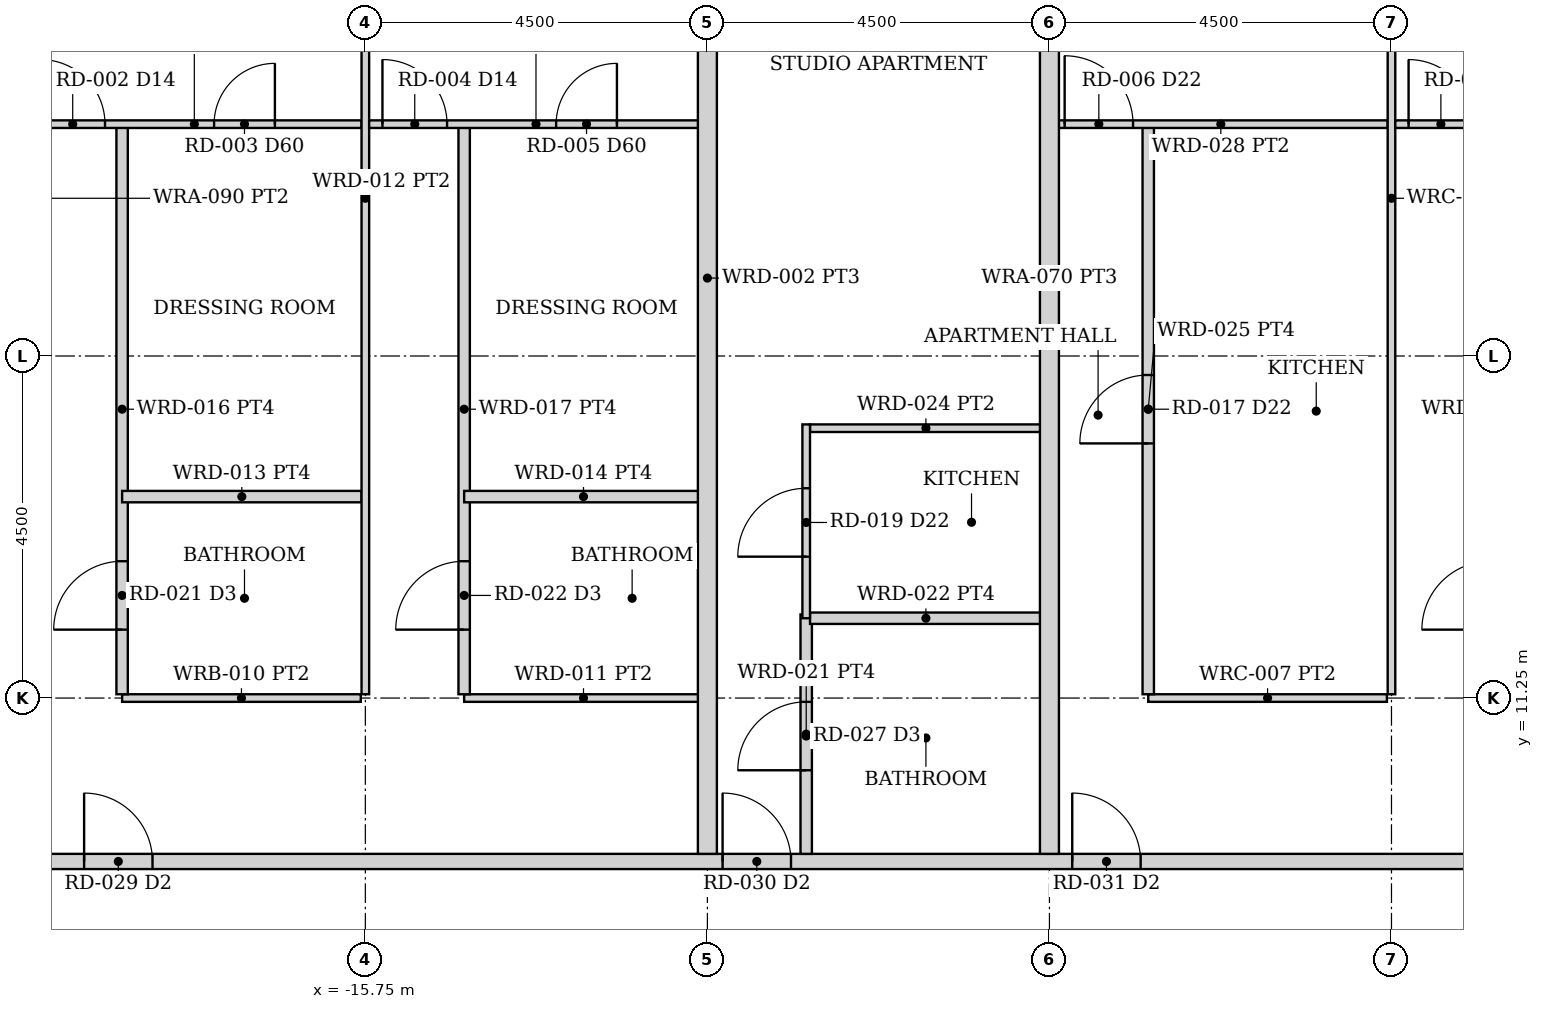
"""IFC4 building model, lengths in metres.
Left out: names, types, materials, properties, quantities, classifications, styles, units other than length and angle.
Written with IfcOpenShell. Run it as: python <this file> out.ifc"""

import sys

from ifc_helpers import new_model, si_unit, direction, frame, frame_2d, origin, place, context, subcontext, project, spatial, rectangle, extrude, element, fill, save


model = new_model("IFC4")
c1 = context("Model", 3, precision=1e-05, world=origin(), true_north=direction((0.0, 1.0)))
c2 = subcontext(c1, "Body", "Model", "MODEL_VIEW")
j1 = project(units=[si_unit("LENGTHUNIT", "METRE"), si_unit("PLANEANGLEUNIT", "RADIAN")], contexts=[c1])
p1 = place(None, origin())
s1 = spatial("IfcSite", under=j1, at=p1, CompositionType="ELEMENT")
p2 = place(p1, origin())
s2 = spatial("IfcBuilding", under=s1, at=p2, CompositionType="ELEMENT")
p3 = place(p2, frame((0.0, 0.0, 58.0)))
s3 = spatial("IfcBuildingStorey", under=s2, at=p3, CompositionType="ELEMENT", Elevation=58.0)
p4 = place(p3, frame((-24.55, 9.1, 0.0), z_axis=(0.0, 0.0, 1.0), x_axis=(1.0, 0.0, 0.0)))
e1 = element("IfcWall", 1, at=p4, inside=s3, PredefinedType="PARTITIONING", context=c2, shape_type="SweptSolid", body=[
    extrude(rectangle(XDim=49.1, YDim=0.2, at=frame_2d((24.55, 0.0))), origin(), (0.0, 0.0, 1.0), 2.373),
])
p5 = place(p4, frame((5.1, 0.0, 0.0)))
e2 = element("IfcOpeningElement", 2, at=p5, cuts=e1, PredefinedType="OPENING", context=c2, shape_type="SweptSolid", body=[
    extrude(rectangle(XDim=0.9, YDim=2.1, at=frame_2d((0.45, 1.05))), frame((0.0, 0.11, 0.0), z_axis=(0.0, -1.0, 0.0), x_axis=(1.0, 0.0, 0.0)), (0.0, 0.0, 1.0), 0.22),
])
p6 = place(p4, frame((13.5, 0.0, 0.0)))
e3 = element("IfcOpeningElement", 3, at=p6, cuts=e1, PredefinedType="OPENING", context=c2, shape_type="SweptSolid", body=[
    extrude(rectangle(XDim=0.9, YDim=2.1, at=frame_2d((0.45, 1.05))), frame((0.0, 0.11, 0.0), z_axis=(0.0, -1.0, 0.0), x_axis=(1.0, 0.0, 0.0)), (0.0, 0.0, 1.0), 0.22),
])
p7 = place(p4, frame((18.1, 0.0, 0.0)))
e4 = element("IfcOpeningElement", 4, at=p7, cuts=e1, PredefinedType="OPENING", context=c2, shape_type="SweptSolid", body=[
    extrude(rectangle(XDim=0.9, YDim=2.1, at=frame_2d((0.45, 1.05))), frame((0.0, 0.11, 0.0), z_axis=(0.0, -1.0, 0.0), x_axis=(1.0, 0.0, 0.0)), (0.0, 0.0, 1.0), 0.22),
])
p8 = place(p4, frame((31.5, 0.0, 0.0)))
e5 = element("IfcOpeningElement", 5, at=p8, cuts=e1, PredefinedType="OPENING", context=c2, shape_type="SweptSolid", body=[
    extrude(rectangle(XDim=0.9, YDim=2.1, at=frame_2d((0.45, 1.05))), frame((0.0, 0.11, 0.0), z_axis=(0.0, -1.0, 0.0), x_axis=(1.0, 0.0, 0.0)), (0.0, 0.0, 1.0), 0.22),
])
p9 = place(p4, frame((43.1, 0.0, 0.0)))
e6 = element("IfcOpeningElement", 6, at=p9, cuts=e1, PredefinedType="OPENING", context=c2, shape_type="SweptSolid", body=[
    extrude(rectangle(XDim=0.9, YDim=2.1, at=frame_2d((0.45, 1.05))), frame((0.0, 0.11, 0.0), z_axis=(0.0, -1.0, 0.0), x_axis=(1.0, 0.0, 0.0)), (0.0, 0.0, 1.0), 0.22),
])
p10 = place(p3, frame((-18.95, 11.25, 0.0), z_axis=(0.0, 0.0, 1.0), x_axis=(1.0, 0.0, 0.0)))
e7 = element("IfcWall", 7, at=p10, inside=s3, PredefinedType="PARTITIONING", context=c2, shape_type="SweptSolid", body=[
    extrude(rectangle(XDim=3.14, YDim=0.1, at=frame_2d((1.57, 0.0))), origin(), (0.0, 0.0, 1.0), 2.373),
])
p11 = place(p3, frame((-18.95, 11.3, 0.0), z_axis=(0.0, 0.0, 1.0), x_axis=(0.0, 1.0, 0.0)))
e8 = element("IfcWall", 8, at=p11, inside=s3, PredefinedType="PARTITIONING", context=c2, shape_type="SweptSolid", body=[
    extrude(rectangle(XDim=7.5, YDim=0.15, at=frame_2d((3.75, 0.0))), origin(), (0.0, 0.0, 1.0), 2.373),
])
p12 = place(p11, frame((0.85, 0.0, 0.0)))
e9 = element("IfcOpeningElement", 9, at=p12, cuts=e8, PredefinedType="OPENING", context=c2, shape_type="SweptSolid", body=[
    extrude(rectangle(XDim=0.9, YDim=2.1, at=frame_2d((0.45, 1.05))), frame((0.0, 0.085, 0.0), z_axis=(0.0, -1.0, 0.0), x_axis=(1.0, 0.0, 0.0)), (0.0, 0.0, 1.0), 0.17),
])
p13 = place(p3, frame((-20.2, 18.8, 0.0), z_axis=(0.0, 0.0, 1.0), x_axis=(1.0, 0.0, 0.0)))
e10 = element("IfcWall", 10, at=p13, inside=s3, PredefinedType="PARTITIONING", context=c2, shape_type="SweptSolid", body=[
    extrude(rectangle(XDim=4.4, YDim=0.1, at=frame_2d((2.2, 0.0))), origin(), (0.0, 0.0, 1.0), 2.373),
])
p14 = place(p13, frame((0.175, 0.0, 0.0)))
e11 = element("IfcOpeningElement", 11, at=p14, cuts=e10, PredefinedType="OPENING", context=c2, shape_type="SweptSolid", body=[
    extrude(rectangle(XDim=0.85, YDim=2.1, at=frame_2d((0.425, 1.05))), frame((0.0, 0.06, 0.0), z_axis=(0.0, -1.0, 0.0), x_axis=(1.0, 0.0, 0.0)), (0.0, 0.0, 1.0), 0.12),
])
p15 = place(p13, frame((2.46, 0.0, 0.0)))
e12 = element("IfcOpeningElement", 12, at=p15, cuts=e10, PredefinedType="OPENING", context=c2, shape_type="SweptSolid", body=[
    extrude(rectangle(XDim=0.8, YDim=2.1, at=frame_2d((0.4, 1.05))), frame((0.0, 0.06, 0.0), z_axis=(0.0, -1.0, 0.0), x_axis=(1.0, 0.0, 0.0)), (0.0, 0.0, 1.0), 0.12),
])
p16 = place(p3, frame((-18.95, 13.9, 0.0), z_axis=(0.0, 0.0, 1.0), x_axis=(1.0, 0.0, 0.0)))
e13 = element("IfcWall", 13, at=p16, inside=s3, PredefinedType="PARTITIONING", context=c2, shape_type="SweptSolid", body=[
    extrude(rectangle(XDim=3.15, YDim=0.15, at=frame_2d((1.575, 0.0))), origin(), (0.0, 0.0, 1.0), 2.373),
])
p17 = place(p3, frame((-15.75, 11.3, 0.0), z_axis=(0.0, 0.0, 1.0), x_axis=(0.0, 1.0, 0.0)))
e14 = element("IfcWall", 14, at=p17, inside=s3, PredefinedType="PARTITIONING", context=c2, shape_type="SweptSolid", body=[
    extrude(rectangle(XDim=13.05, YDim=0.1, at=frame_2d((6.525, 0.0))), origin(), (0.0, 0.0, 1.0), 2.373),
])
p18 = place(p3, frame((-14.45, 11.25, 0.0), z_axis=(0.0, 0.0, 1.0), x_axis=(1.0, 0.0, 0.0)))
e15 = element("IfcWall", 15, at=p18, inside=s3, PredefinedType="PARTITIONING", context=c2, shape_type="SweptSolid", body=[
    extrude(rectangle(XDim=3.14, YDim=0.1, at=frame_2d((1.57, 0.0))), origin(), (0.0, 0.0, 1.0), 2.373),
])
p19 = place(p3, frame((-14.45, 11.3, 0.0), z_axis=(0.0, 0.0, 1.0), x_axis=(0.0, 1.0, 0.0)))
e16 = element("IfcWall", 16, at=p19, inside=s3, PredefinedType="PARTITIONING", context=c2, shape_type="SweptSolid", body=[
    extrude(rectangle(XDim=7.5, YDim=0.15, at=frame_2d((3.75, 0.0))), origin(), (0.0, 0.0, 1.0), 2.373),
])
p20 = place(p19, frame((0.85, 0.0, 0.0)))
e17 = element("IfcOpeningElement", 17, at=p20, cuts=e16, PredefinedType="OPENING", context=c2, shape_type="SweptSolid", body=[
    extrude(rectangle(XDim=0.9, YDim=2.1, at=frame_2d((0.45, 1.05))), frame((0.0, 0.085, 0.0), z_axis=(0.0, -1.0, 0.0), x_axis=(1.0, 0.0, 0.0)), (0.0, 0.0, 1.0), 0.17),
])
p21 = place(p3, frame((-15.7, 18.8, 0.0), z_axis=(0.0, 0.0, 1.0), x_axis=(1.0, 0.0, 0.0)))
e18 = element("IfcWall", 18, at=p21, inside=s3, PredefinedType="PARTITIONING", context=c2, shape_type="SweptSolid", body=[
    extrude(rectangle(XDim=4.39, YDim=0.1, at=frame_2d((2.195, 0.0))), origin(), (0.0, 0.0, 1.0), 2.373),
])
p22 = place(p21, frame((0.175, 0.0, 0.0)))
e19 = element("IfcOpeningElement", 19, at=p22, cuts=e18, PredefinedType="OPENING", context=c2, shape_type="SweptSolid", body=[
    extrude(rectangle(XDim=0.85, YDim=2.1, at=frame_2d((0.425, 1.05))), frame((0.0, 0.06, 0.0), z_axis=(0.0, -1.0, 0.0), x_axis=(1.0, 0.0, 0.0)), (0.0, 0.0, 1.0), 0.12),
])
p23 = place(p21, frame((2.46, 0.0, 0.0)))
e20 = element("IfcOpeningElement", 20, at=p23, cuts=e18, PredefinedType="OPENING", context=c2, shape_type="SweptSolid", body=[
    extrude(rectangle(XDim=0.8, YDim=2.1, at=frame_2d((0.4, 1.05))), frame((0.0, 0.06, 0.0), z_axis=(0.0, -1.0, 0.0), x_axis=(1.0, 0.0, 0.0)), (0.0, 0.0, 1.0), 0.12),
])
p24 = place(p3, frame((-14.45, 13.9, 0.0), z_axis=(0.0, 0.0, 1.0), x_axis=(1.0, 0.0, 0.0)))
e21 = element("IfcWall", 21, at=p24, inside=s3, PredefinedType="PARTITIONING", context=c2, shape_type="SweptSolid", body=[
    extrude(rectangle(XDim=3.14, YDim=0.15, at=frame_2d((1.57, 0.0))), origin(), (0.0, 0.0, 1.0), 2.373),
])
p25 = place(p3, frame((-9.95, 9.2, 0.0), z_axis=(0.0, 0.0, 1.0), x_axis=(0.0, 1.0, 0.0)))
e22 = element("IfcWall", 22, at=p25, inside=s3, PredefinedType="PARTITIONING", context=c2, shape_type="SweptSolid", body=[
    extrude(rectangle(XDim=3.15, YDim=0.15, at=frame_2d((1.575, 0.0))), origin(), (0.0, 0.0, 1.0), 2.373),
])
p26 = place(p25, frame((1.1, 0.0, 0.0)))
e23 = element("IfcOpeningElement", 23, at=p26, cuts=e22, PredefinedType="OPENING", context=c2, shape_type="SweptSolid", body=[
    extrude(rectangle(XDim=0.9, YDim=2.1, at=frame_2d((0.45, 1.05))), frame((0.0, 0.085, 0.0), z_axis=(0.0, -1.0, 0.0), x_axis=(1.0, 0.0, 0.0)), (0.0, 0.0, 1.0), 0.17),
])
p27 = place(p3, frame((-9.9, 12.3, 0.0), z_axis=(0.0, 0.0, 1.0), x_axis=(1.0, 0.0, 0.0)))
e24 = element("IfcWall", 24, at=p27, inside=s3, PredefinedType="PARTITIONING", context=c2, shape_type="SweptSolid", body=[
    extrude(rectangle(XDim=3.05, YDim=0.15, at=frame_2d((1.525, 0.0))), origin(), (0.0, 0.0, 1.0), 2.373),
])
p28 = place(p3, frame((-9.9, 14.8, 0.0), z_axis=(0.0, 0.0, 1.0), x_axis=(1.0, 0.0, 0.0)))
e25 = element("IfcWall", 25, at=p28, inside=s3, PredefinedType="PARTITIONING", context=c2, shape_type="SweptSolid", body=[
    extrude(rectangle(XDim=3.05, YDim=0.1, at=frame_2d((1.525, 0.0))), origin(), (0.0, 0.0, 1.0), 2.373),
])
p29 = place(p3, frame((-9.95, 12.3, 0.0), z_axis=(0.0, 0.0, 1.0), x_axis=(0.0, 1.0, 0.0)))
e26 = element("IfcWall", 26, at=p29, inside=s3, PredefinedType="PARTITIONING", context=c2, shape_type="SweptSolid", body=[
    extrude(rectangle(XDim=2.55, YDim=0.1, at=frame_2d((1.275, 0.0))), origin(), (0.0, 0.0, 1.0), 2.373),
])
p30 = place(p29, frame((0.81, 0.0, 0.0)))
e27 = element("IfcOpeningElement", 27, at=p30, cuts=e26, PredefinedType="OPENING", context=c2, shape_type="SweptSolid", body=[
    extrude(rectangle(XDim=0.9, YDim=2.1, at=frame_2d((0.45, 1.05))), frame((0.0, 0.06, 0.0), z_axis=(0.0, -1.0, 0.0), x_axis=(1.0, 0.0, 0.0)), (0.0, 0.0, 1.0), 0.12),
])
p31 = place(p3, frame((-5.45, 11.25, 0.0), z_axis=(0.0, 0.0, 1.0), x_axis=(1.0, 0.0, 0.0)))
e28 = element("IfcWall", 28, at=p31, inside=s3, PredefinedType="PARTITIONING", context=c2, shape_type="SweptSolid", body=[
    extrude(rectangle(XDim=3.14, YDim=0.1, at=frame_2d((1.57, 0.0))), origin(), (0.0, 0.0, 1.0), 2.373),
])
p32 = place(p3, frame((-5.45, 11.3, 0.0), z_axis=(0.0, 0.0, 1.0), x_axis=(0.0, 1.0, 0.0)))
e29 = element("IfcWall", 29, at=p32, inside=s3, PredefinedType="PARTITIONING", context=c2, shape_type="SweptSolid", body=[
    extrude(rectangle(XDim=7.5, YDim=0.15, at=frame_2d((3.75, 0.0))), origin(), (0.0, 0.0, 1.0), 2.373),
])
p33 = place(p32, frame((3.3, 0.0, 0.0)))
e30 = element("IfcOpeningElement", 30, at=p33, cuts=e29, PredefinedType="OPENING", context=c2, shape_type="SweptSolid", body=[
    extrude(rectangle(XDim=0.9, YDim=2.1, at=frame_2d((0.45, 1.05))), frame((0.0, 0.085, 0.0), z_axis=(0.0, -1.0, 0.0), x_axis=(1.0, 0.0, 0.0)), (0.0, 0.0, 1.0), 0.17),
])
p34 = place(p3, frame((-6.69, 18.8, 0.0), z_axis=(0.0, 0.0, 1.0), x_axis=(1.0, 0.0, 0.0)))
e31 = element("IfcWall", 31, at=p34, inside=s3, PredefinedType="PARTITIONING", context=c2, shape_type="SweptSolid", body=[
    extrude(rectangle(XDim=4.39, YDim=0.1, at=frame_2d((2.195, 0.0))), origin(), (0.0, 0.0, 1.0), 2.373),
])
p35 = place(p34, frame((0.14, 0.0, 0.0)))
e32 = element("IfcOpeningElement", 32, at=p35, cuts=e31, PredefinedType="OPENING", context=c2, shape_type="SweptSolid", body=[
    extrude(rectangle(XDim=0.9, YDim=2.1, at=frame_2d((0.45, 1.05))), frame((0.0, 0.06, 0.0), z_axis=(0.0, -1.0, 0.0), x_axis=(1.0, 0.0, 0.0)), (0.0, 0.0, 1.0), 0.12),
])
p36 = place(p3, frame((-2.25, 11.3, 0.0), z_axis=(0.0, 0.0, 1.0), x_axis=(0.0, 1.0, 0.0)))
e33 = element("IfcWall", 33, at=p36, inside=s3, PredefinedType="PARTITIONING", context=c2, shape_type="SweptSolid", body=[
    extrude(rectangle(XDim=13.05, YDim=0.1, at=frame_2d((6.525, 0.0))), origin(), (0.0, 0.0, 1.0), 2.373),
])
p37 = place(p3, frame((-2.2, 18.8, 0.0), z_axis=(0.0, 0.0, 1.0), x_axis=(1.0, 0.0, 0.0)))
e34 = element("IfcWall", 34, at=p37, inside=s3, PredefinedType="PARTITIONING", context=c2, shape_type="SweptSolid", body=[
    extrude(rectangle(XDim=4.4, YDim=0.1, at=frame_2d((2.2, 0.0))), origin(), (0.0, 0.0, 1.0), 2.373),
])
p38 = place(p37, frame((0.175, 0.0, 0.0)))
e35 = element("IfcOpeningElement", 35, at=p38, cuts=e34, PredefinedType="OPENING", context=c2, shape_type="SweptSolid", body=[
    extrude(rectangle(XDim=0.85, YDim=2.1, at=frame_2d((0.425, 1.05))), frame((0.0, 0.06, 0.0), z_axis=(0.0, -1.0, 0.0), x_axis=(1.0, 0.0, 0.0)), (0.0, 0.0, 1.0), 0.12),
])
p39 = place(p37, frame((2.46, 0.0, 0.0)))
e36 = element("IfcOpeningElement", 36, at=p39, cuts=e34, PredefinedType="OPENING", context=c2, shape_type="SweptSolid", body=[
    extrude(rectangle(XDim=0.8, YDim=2.1, at=frame_2d((0.4, 1.05))), frame((0.0, 0.06, 0.0), z_axis=(0.0, -1.0, 0.0), x_axis=(1.0, 0.0, 0.0)), (0.0, 0.0, 1.0), 0.12),
])
for number, where, z_axis, x_axis in (
    (37, (-11.25, 9.2, 0.0), (0.0, 0.0, 1.0), (0.0, 1.0, 0.0)),
    (38, (-6.75, 9.2, 0.0), (0.0, 0.0, 1.0), (0.0, 1.0, 0.0)),
):
    element("IfcWall", number, at=place(p3, frame(where, z_axis=z_axis, x_axis=x_axis)), inside=s3, PredefinedType="PARTITIONING", context=c2, shape_type="SweptSolid", body=[
        extrude(rectangle(XDim=15.15, YDim=0.25, at=frame_2d((7.575, 0.0))), origin(), (0.0, 0.0, 1.0), 2.373),
    ])
p40 = place(p5, origin())
e39 = element("IfcDoor", 39, at=p40, inside=s3, OperationType="SINGLE_SWING_LEFT", PredefinedType="DOOR", context=c2, shape_type="SweptSolid", body=[
    extrude(rectangle(XDim=0.9, YDim=2.1, at=frame_2d((0.45, 1.05))), frame((0.0, 0.025, 0.0), z_axis=(0.0, -1.0, 0.0), x_axis=(1.0, 0.0, 0.0)), (0.0, 0.0, 1.0), 0.05),
])
fill(e2, e39)
p41 = place(p14, origin())
e40 = element("IfcDoor", 40, at=p41, inside=s3, OperationType="SINGLE_SWING_LEFT", PredefinedType="DOOR", context=c2, shape_type="SweptSolid", body=[
    extrude(rectangle(XDim=0.85, YDim=2.1, at=frame_2d((0.425, 1.05))), frame((0.0, 0.025, 0.0), z_axis=(0.0, -1.0, 0.0), x_axis=(1.0, 0.0, 0.0)), (0.0, 0.0, 1.0), 0.05),
])
fill(e11, e40)
p42 = place(p12, origin())
e41 = element("IfcDoor", 41, at=p42, inside=s3, OperationType="SINGLE_SWING_LEFT", PredefinedType="DOOR", context=c2, shape_type="SweptSolid", body=[
    extrude(rectangle(XDim=0.9, YDim=2.1, at=frame_2d((0.45, 1.05))), frame((0.0, 0.025, 0.0), z_axis=(0.0, -1.0, 0.0), x_axis=(1.0, 0.0, 0.0)), (0.0, 0.0, 1.0), 0.05),
])
fill(e9, e41)
p43 = place(p15, origin())
e42 = element("IfcDoor", 42, at=p43, inside=s3, OperationType="SINGLE_SWING_RIGHT", PredefinedType="DOOR", context=c2, shape_type="SweptSolid", body=[
    extrude(rectangle(XDim=0.8, YDim=2.1, at=frame_2d((0.4, 1.05))), frame((0.0, 0.025, 0.0), z_axis=(0.0, -1.0, 0.0), x_axis=(1.0, 0.0, 0.0)), (0.0, 0.0, 1.0), 0.05),
])
fill(e12, e42)
p44 = place(p22, origin())
e43 = element("IfcDoor", 43, at=p44, inside=s3, OperationType="SINGLE_SWING_LEFT", PredefinedType="DOOR", context=c2, shape_type="SweptSolid", body=[
    extrude(rectangle(XDim=0.85, YDim=2.1, at=frame_2d((0.425, 1.05))), frame((0.0, 0.025, 0.0), z_axis=(0.0, -1.0, 0.0), x_axis=(1.0, 0.0, 0.0)), (0.0, 0.0, 1.0), 0.05),
])
fill(e19, e43)
p45 = place(p20, origin())
e44 = element("IfcDoor", 44, at=p45, inside=s3, OperationType="SINGLE_SWING_LEFT", PredefinedType="DOOR", context=c2, shape_type="SweptSolid", body=[
    extrude(rectangle(XDim=0.9, YDim=2.1, at=frame_2d((0.45, 1.05))), frame((0.0, 0.025, 0.0), z_axis=(0.0, -1.0, 0.0), x_axis=(1.0, 0.0, 0.0)), (0.0, 0.0, 1.0), 0.05),
])
fill(e17, e44)
p46 = place(p23, origin())
e45 = element("IfcDoor", 45, at=p46, inside=s3, OperationType="SINGLE_SWING_RIGHT", PredefinedType="DOOR", context=c2, shape_type="SweptSolid", body=[
    extrude(rectangle(XDim=0.8, YDim=2.1, at=frame_2d((0.4, 1.05))), frame((0.0, 0.025, 0.0), z_axis=(0.0, -1.0, 0.0), x_axis=(1.0, 0.0, 0.0)), (0.0, 0.0, 1.0), 0.05),
])
fill(e20, e45)
p47 = place(p6, origin())
e46 = element("IfcDoor", 46, at=p47, inside=s3, OperationType="SINGLE_SWING_LEFT", PredefinedType="DOOR", context=c2, shape_type="SweptSolid", body=[
    extrude(rectangle(XDim=0.9, YDim=2.1, at=frame_2d((0.45, 1.05))), frame((0.0, 0.025, 0.0), z_axis=(0.0, -1.0, 0.0), x_axis=(1.0, 0.0, 0.0)), (0.0, 0.0, 1.0), 0.05),
])
fill(e3, e46)
p48 = place(p26, origin())
e47 = element("IfcDoor", 47, at=p48, inside=s3, OperationType="SINGLE_SWING_LEFT", PredefinedType="DOOR", context=c2, shape_type="SweptSolid", body=[
    extrude(rectangle(XDim=0.9, YDim=2.1, at=frame_2d((0.45, 1.05))), frame((0.0, 0.025, 0.0), z_axis=(0.0, -1.0, 0.0), x_axis=(1.0, 0.0, 0.0)), (0.0, 0.0, 1.0), 0.05),
])
fill(e23, e47)
p49 = place(p30, origin())
e48 = element("IfcDoor", 48, at=p49, inside=s3, OperationType="SINGLE_SWING_LEFT", PredefinedType="DOOR", context=c2, shape_type="SweptSolid", body=[
    extrude(rectangle(XDim=0.9, YDim=2.1, at=frame_2d((0.45, 1.05))), frame((0.0, 0.025, 0.0), z_axis=(0.0, -1.0, 0.0), x_axis=(1.0, 0.0, 0.0)), (0.0, 0.0, 1.0), 0.05),
])
fill(e27, e48)
p50 = place(p7, origin())
e49 = element("IfcDoor", 49, at=p50, inside=s3, OperationType="SINGLE_SWING_LEFT", PredefinedType="DOOR", context=c2, shape_type="SweptSolid", body=[
    extrude(rectangle(XDim=0.9, YDim=2.1, at=frame_2d((0.45, 1.05))), frame((0.0, 0.025, 0.0), z_axis=(0.0, -1.0, 0.0), x_axis=(1.0, 0.0, 0.0)), (0.0, 0.0, 1.0), 0.05),
])
fill(e4, e49)
p51 = place(p33, origin())
e50 = element("IfcDoor", 50, at=p51, inside=s3, OperationType="SINGLE_SWING_LEFT", PredefinedType="DOOR", context=c2, shape_type="SweptSolid", body=[
    extrude(rectangle(XDim=0.9, YDim=2.1, at=frame_2d((0.45, 1.05))), frame((0.0, 0.025, 0.0), z_axis=(0.0, -1.0, 0.0), x_axis=(1.0, 0.0, 0.0)), (0.0, 0.0, 1.0), 0.05),
])
fill(e30, e50)
p52 = place(p35, origin())
e51 = element("IfcDoor", 51, at=p52, inside=s3, OperationType="SINGLE_SWING_LEFT", PredefinedType="DOOR", context=c2, shape_type="SweptSolid", body=[
    extrude(rectangle(XDim=0.9, YDim=2.1, at=frame_2d((0.45, 1.05))), frame((0.0, 0.025, 0.0), z_axis=(0.0, -1.0, 0.0), x_axis=(1.0, 0.0, 0.0)), (0.0, 0.0, 1.0), 0.05),
])
fill(e32, e51)
p53 = place(p38, origin())
e52 = element("IfcDoor", 52, at=p53, inside=s3, OperationType="SINGLE_SWING_LEFT", PredefinedType="DOOR", context=c2, shape_type="SweptSolid", body=[
    extrude(rectangle(XDim=0.85, YDim=2.1, at=frame_2d((0.425, 1.05))), frame((0.0, 0.025, 0.0), z_axis=(0.0, -1.0, 0.0), x_axis=(1.0, 0.0, 0.0)), (0.0, 0.0, 1.0), 0.05),
])
fill(e35, e52)
save(model, sys.argv[1])
